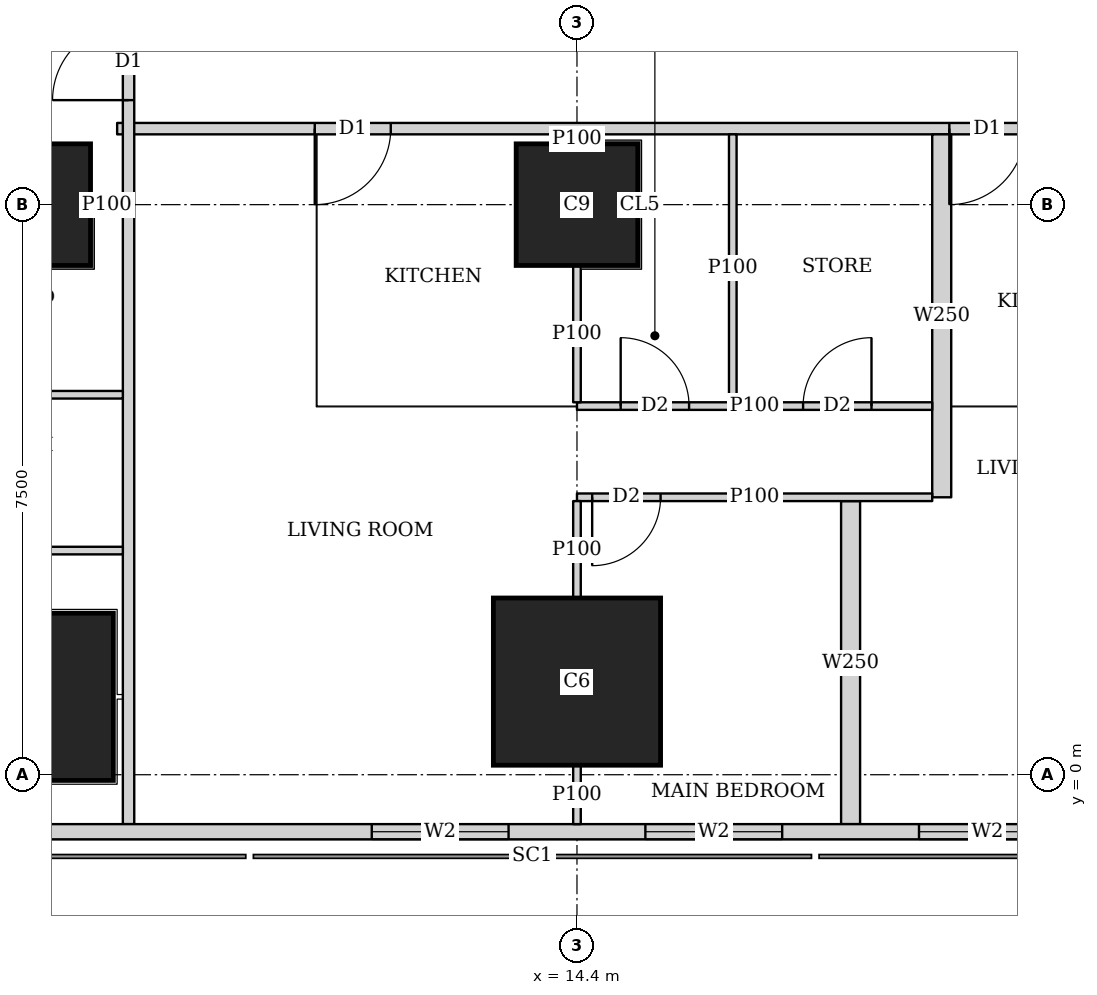
"""IFC4 building model, lengths in metres.
Left out: names, types, materials, properties, quantities, classifications, styles, units other than length and angle.
Written with IfcOpenShell. Run it as: python <this file> out.ifc"""

import sys

from ifc_helpers import new_model, si_unit, direction, frame, frame_2d, origin, origin_2d, place, context, subcontext, project, spatial, rectangle, extrude, element, fill, save


model = new_model("IFC4")
c1 = context("Model", 3, precision=1e-05, world=origin(), true_north=direction((0.0, 1.0)))
c2 = subcontext(c1, "Body", "Model", "MODEL_VIEW")
j1 = project(units=[si_unit("LENGTHUNIT", "METRE"), si_unit("PLANEANGLEUNIT", "RADIAN")], contexts=[c1])
p1 = place(None, origin())
s1 = spatial("IfcSite", under=j1, at=p1, CompositionType="ELEMENT")
p2 = place(p1, origin())
s2 = spatial("IfcBuilding", under=s1, at=p2, CompositionType="ELEMENT")
p3 = place(p2, frame((0.0, 0.0, 111.65)))
s3 = spatial("IfcBuildingStorey", under=s2, at=p3, CompositionType="ELEMENT", Elevation=111.65)
for number, where, z_axis, x_axis in (
    (1, (7.2, 1.025, 0.0), (0.0, 0.0, 1.0), (1.0, 0.0, 0.0)),
    (2, (14.4, 1.225, 0.0), (0.0, 0.0, 1.0), (1.0, 0.0, 0.0)),
):
    element("IfcColumn", number, at=place(p3, frame(where, z_axis=z_axis, x_axis=x_axis)), inside=s3, PredefinedType="COLUMN", context=c2, shape_type="SweptSolid", body=[
        extrude(rectangle(XDim=2.2, YDim=2.2, at=origin_2d()), origin(), (0.0, 0.0, 1.0), 3.75),
    ])
for number, where, z_axis, x_axis in (
    (3, (7.2, 7.5, 0.0), (0.0, 0.0, 1.0), (1.0, 0.0, 0.0)),
    (4, (14.4, 7.5, 0.0), (0.0, 0.0, 1.0), (1.0, 0.0, 0.0)),
):
    element("IfcColumn", number, at=place(p3, frame(where, z_axis=z_axis, x_axis=x_axis)), inside=s3, PredefinedType="COLUMN", context=c2, shape_type="SweptSolid", body=[
        extrude(rectangle(XDim=1.6, YDim=1.6, at=origin_2d()), origin(), (0.0, 0.0, 1.0), 3.75),
    ])
p4 = place(p3, frame((2.163, -0.75, 0.0), z_axis=(0.0, 0.0, 1.0), x_axis=(1.0, 0.0, 0.0)))
e5 = element("IfcWall", 5, at=p4, inside=s3, PredefinedType="SOLIDWALL", context=c2, shape_type="SweptSolid", body=[
    extrude(rectangle(XDim=45.628, YDim=0.2, at=frame_2d((22.814, 0.0))), origin(), (0.0, 0.0, 1.0), 3.5),
])
p5 = place(p4, frame((9.537, 0.0, 0.9)))
e6 = element("IfcOpeningElement", 6, at=p5, cuts=e5, PredefinedType="OPENING", context=c2, shape_type="SweptSolid", body=[
    extrude(rectangle(XDim=1.8, YDim=1.5, at=frame_2d((0.9, 0.75))), frame((0.0, 0.11, 0.0), z_axis=(0.0, -1.0, 0.0), x_axis=(1.0, 0.0, 0.0)), (0.0, 0.0, 1.0), 0.22),
])
p6 = place(p4, frame((13.137, 0.0, 0.9)))
e7 = element("IfcOpeningElement", 7, at=p6, cuts=e5, PredefinedType="OPENING", context=c2, shape_type="SweptSolid", body=[
    extrude(rectangle(XDim=1.8, YDim=1.5, at=frame_2d((0.9, 0.75))), frame((0.0, 0.11, 0.0), z_axis=(0.0, -1.0, 0.0), x_axis=(1.0, 0.0, 0.0)), (0.0, 0.0, 1.0), 0.22),
])
p7 = place(p4, frame((16.737, 0.0, 0.9)))
e8 = element("IfcOpeningElement", 8, at=p7, cuts=e5, PredefinedType="OPENING", context=c2, shape_type="SweptSolid", body=[
    extrude(rectangle(XDim=1.8, YDim=1.5, at=frame_2d((0.9, 0.75))), frame((0.0, 0.11, 0.0), z_axis=(0.0, -1.0, 0.0), x_axis=(1.0, 0.0, 0.0)), (0.0, 0.0, 1.0), 0.22),
])
p8 = place(p4, frame((20.337, 0.0, 0.9)))
e9 = element("IfcOpeningElement", 9, at=p8, cuts=e5, PredefinedType="OPENING", context=c2, shape_type="SweptSolid", body=[
    extrude(rectangle(XDim=1.8, YDim=1.5, at=frame_2d((0.9, 0.75))), frame((0.0, 0.11, 0.0), z_axis=(0.0, -1.0, 0.0), x_axis=(1.0, 0.0, 0.0)), (0.0, 0.0, 1.0), 0.22),
])
p9 = place(p4, frame((23.937, 0.0, 0.9)))
e10 = element("IfcOpeningElement", 10, at=p9, cuts=e5, PredefinedType="OPENING", context=c2, shape_type="SweptSolid", body=[
    extrude(rectangle(XDim=1.8, YDim=1.5, at=frame_2d((0.9, 0.75))), frame((0.0, 0.11, 0.0), z_axis=(0.0, -1.0, 0.0), x_axis=(1.0, 0.0, 0.0)), (0.0, 0.0, 1.0), 0.22),
])
p10 = place(p4, frame((27.537, 0.0, 0.9)))
e11 = element("IfcOpeningElement", 11, at=p10, cuts=e5, PredefinedType="OPENING", context=c2, shape_type="SweptSolid", body=[
    extrude(rectangle(XDim=1.8, YDim=1.5, at=frame_2d((0.9, 0.75))), frame((0.0, 0.11, 0.0), z_axis=(0.0, -1.0, 0.0), x_axis=(1.0, 0.0, 0.0)), (0.0, 0.0, 1.0), 0.22),
])
p11 = place(p4, frame((31.137, 0.0, 0.9)))
e12 = element("IfcOpeningElement", 12, at=p11, cuts=e5, PredefinedType="OPENING", context=c2, shape_type="SweptSolid", body=[
    extrude(rectangle(XDim=1.8, YDim=1.5, at=frame_2d((0.9, 0.75))), frame((0.0, 0.11, 0.0), z_axis=(0.0, -1.0, 0.0), x_axis=(1.0, 0.0, 0.0)), (0.0, 0.0, 1.0), 0.22),
])
p12 = place(p4, frame((34.737, 0.0, 0.9)))
e13 = element("IfcOpeningElement", 13, at=p12, cuts=e5, PredefinedType="OPENING", context=c2, shape_type="SweptSolid", body=[
    extrude(rectangle(XDim=1.8, YDim=1.5, at=frame_2d((0.9, 0.75))), frame((0.0, 0.11, 0.0), z_axis=(0.0, -1.0, 0.0), x_axis=(1.0, 0.0, 0.0)), (0.0, 0.0, 1.0), 0.22),
])
p13 = place(p3, frame((8.5, -0.65, 0.0), z_axis=(0.0, 0.0, 1.0), x_axis=(0.0, 1.0, 0.0)))
e14 = element("IfcWall", 14, at=p13, inside=s3, PredefinedType="SOLIDWALL", context=c2, shape_type="SweptSolid", body=[
    extrude(rectangle(XDim=46.3, YDim=0.15, at=frame_2d((23.15, 0.0))), origin(), (0.0, 0.0, 1.0), 2.2),
])
p14 = place(p13, frame((9.525, 0.0, 0.0)))
e15 = element("IfcOpeningElement", 15, at=p14, cuts=e14, PredefinedType="OPENING", context=c2, shape_type="SweptSolid", body=[
    extrude(rectangle(XDim=1.0, YDim=2.1, at=frame_2d((0.5, 1.05))), frame((0.0, 0.085, 0.0), z_axis=(0.0, -1.0, 0.0), x_axis=(1.0, 0.0, 0.0)), (0.0, 0.0, 1.0), 0.17),
])
p15 = place(p13, frame((13.275, 0.0, 0.0)))
e16 = element("IfcOpeningElement", 16, at=p15, cuts=e14, PredefinedType="OPENING", context=c2, shape_type="SweptSolid", body=[
    extrude(rectangle(XDim=1.0, YDim=2.1, at=frame_2d((0.5, 1.05))), frame((0.0, 0.085, 0.0), z_axis=(0.0, -1.0, 0.0), x_axis=(1.0, 0.0, 0.0)), (0.0, 0.0, 1.0), 0.17),
])
p16 = place(p13, frame((25.15, 0.0, 0.0)))
e17 = element("IfcOpeningElement", 17, at=p16, cuts=e14, PredefinedType="OPENING", context=c2, shape_type="SweptSolid", body=[
    extrude(rectangle(XDim=1.0, YDim=2.1, at=frame_2d((0.5, 1.05))), frame((0.0, 0.085, 0.0), z_axis=(0.0, -1.0, 0.0), x_axis=(1.0, 0.0, 0.0)), (0.0, 0.0, 1.0), 0.17),
])
p17 = place(p3, frame((40.053, 8.5, 0.0), z_axis=(0.0, 0.0, 1.0), x_axis=(-1.0, 0.0, 0.0)))
e18 = element("IfcWall", 18, at=p17, inside=s3, PredefinedType="SOLIDWALL", context=c2, shape_type="SweptSolid", body=[
    extrude(rectangle(XDim=31.703, YDim=0.15, at=frame_2d((15.852, 0.0))), origin(), (0.0, 0.0, 1.0), 3.5),
])
p18 = place(p17, frame((28.103, 0.0, 0.0)))
e19 = element("IfcOpeningElement", 19, at=p18, cuts=e18, PredefinedType="OPENING", context=c2, shape_type="SweptSolid", body=[
    extrude(rectangle(XDim=1.0, YDim=2.1, at=frame_2d((0.5, 1.05))), frame((0.0, 0.085, 0.0), z_axis=(0.0, -1.0, 0.0), x_axis=(1.0, 0.0, 0.0)), (0.0, 0.0, 1.0), 0.17),
])
p19 = place(p17, frame((19.754, 0.0, 0.0)))
e20 = element("IfcOpeningElement", 20, at=p19, cuts=e18, PredefinedType="OPENING", context=c2, shape_type="SweptSolid", body=[
    extrude(rectangle(XDim=1.0, YDim=2.1, at=frame_2d((0.5, 1.05))), frame((0.0, 0.085, 0.0), z_axis=(0.0, -1.0, 0.0), x_axis=(1.0, 0.0, 0.0)), (0.0, 0.0, 1.0), 0.17),
])
p20 = place(p17, frame((8.353, 0.0, 0.0)))
e21 = element("IfcOpeningElement", 21, at=p20, cuts=e18, PredefinedType="OPENING", context=c2, shape_type="SweptSolid", body=[
    extrude(rectangle(XDim=1.0, YDim=2.1, at=frame_2d((0.5, 1.05))), frame((0.0, 0.085, 0.0), z_axis=(0.0, -1.0, 0.0), x_axis=(1.0, 0.0, 0.0)), (0.0, 0.0, 1.0), 0.17),
])
p21 = place(p3, frame((4.9, 4.999, 0.0), z_axis=(0.0, 0.0, 1.0), x_axis=(1.0, 0.0, 0.0)))
e22 = element("IfcWall", 22, at=p21, inside=s3, PredefinedType="PARTITIONING", context=c2, shape_type="SweptSolid", body=[
    extrude(rectangle(XDim=3.525, YDim=0.1, at=frame_2d((1.763, 0.0))), origin(), (0.0, 0.0, 1.0), 3.5),
])
p22 = place(p3, frame((8.001, 7.5, 0.0), z_axis=(0.0, 0.0, 1.0), x_axis=(1.0, 0.0, 0.0)))
e23 = element("IfcWall", 23, at=p22, inside=s3, PredefinedType="PARTITIONING", context=c2, shape_type="SweptSolid", body=[
    extrude(rectangle(XDim=0.424, YDim=0.1, at=frame_2d((0.212, 0.0))), origin(), (0.0, 0.0, 1.0), 3.5),
])
p23 = place(p3, frame((4.9, 2.949, 0.0), z_axis=(0.0, 0.0, 1.0), x_axis=(1.0, 0.0, 0.0)))
e24 = element("IfcWall", 24, at=p23, inside=s3, PredefinedType="PARTITIONING", context=c2, shape_type="SweptSolid", body=[
    extrude(rectangle(XDim=3.525, YDim=0.1, at=frame_2d((1.763, 0.0))), origin(), (0.0, 0.0, 1.0), 3.5),
])
p24 = place(p23, frame((0.45, 0.0, 0.0)))
e25 = element("IfcOpeningElement", 25, at=p24, cuts=e24, PredefinedType="OPENING", context=c2, shape_type="SweptSolid", body=[
    extrude(rectangle(XDim=0.9, YDim=2.1, at=frame_2d((0.45, 1.05))), frame((0.0, 0.06, 0.0), z_axis=(0.0, -1.0, 0.0), x_axis=(1.0, 0.0, 0.0)), (0.0, 0.0, 1.0), 0.12),
])
p25 = place(p3, frame((19.074, 3.65, 0.0), z_axis=(0.0, 0.0, 1.0), x_axis=(-1.0, 0.0, 0.0)))
e26 = element("IfcWall", 26, at=p25, inside=s3, PredefinedType="PARTITIONING", context=c2, shape_type="SweptSolid", body=[
    extrude(rectangle(XDim=4.674, YDim=0.1, at=frame_2d((2.337, 0.0))), origin(), (0.0, 0.0, 1.0), 3.5),
])
p26 = place(p25, frame((3.574, 0.0, 0.0)))
e27 = element("IfcOpeningElement", 27, at=p26, cuts=e26, PredefinedType="OPENING", context=c2, shape_type="SweptSolid", body=[
    extrude(rectangle(XDim=0.9, YDim=2.1, at=frame_2d((0.45, 1.05))), frame((0.0, 0.06, 0.0), z_axis=(0.0, -1.0, 0.0), x_axis=(1.0, 0.0, 0.0)), (0.0, 0.0, 1.0), 0.12),
])
p27 = place(p3, frame((19.074, 4.85, 0.0), z_axis=(0.0, 0.0, 1.0), x_axis=(-1.0, 0.0, 0.0)))
e28 = element("IfcWall", 28, at=p27, inside=s3, PredefinedType="PARTITIONING", context=c2, shape_type="SweptSolid", body=[
    extrude(rectangle(XDim=4.674, YDim=0.1, at=frame_2d((2.337, 0.0))), origin(), (0.0, 0.0, 1.0), 3.5),
])
p28 = place(p27, frame((3.199, 0.0, 0.0)))
e29 = element("IfcOpeningElement", 29, at=p28, cuts=e28, PredefinedType="OPENING", context=c2, shape_type="SweptSolid", body=[
    extrude(rectangle(XDim=0.9, YDim=2.1, at=frame_2d((0.45, 1.05))), frame((0.0, 0.06, 0.0), z_axis=(0.0, -1.0, 0.0), x_axis=(1.0, 0.0, 0.0)), (0.0, 0.0, 1.0), 0.12),
])
p29 = place(p27, frame((0.799, 0.0, 0.0)))
e30 = element("IfcOpeningElement", 30, at=p29, cuts=e28, PredefinedType="OPENING", context=c2, shape_type="SweptSolid", body=[
    extrude(rectangle(XDim=0.9, YDim=2.1, at=frame_2d((0.45, 1.05))), frame((0.0, 0.06, 0.0), z_axis=(0.0, -1.0, 0.0), x_axis=(1.0, 0.0, 0.0)), (0.0, 0.0, 1.0), 0.12),
])
p30 = place(p3, frame((14.4, -0.65, 0.0), z_axis=(0.0, 0.0, 1.0), x_axis=(0.0, 1.0, 0.0)))
e31 = element("IfcWall", 31, at=p30, inside=s3, PredefinedType="PARTITIONING", context=c2, shape_type="SweptSolid", body=[
    extrude(rectangle(XDim=0.774, YDim=0.1, at=frame_2d((0.387, 0.0))), origin(), (0.0, 0.0, 1.0), 3.5),
])
p31 = place(p3, frame((14.4, 2.326, 0.0), z_axis=(0.0, 0.0, 1.0), x_axis=(0.0, 1.0, 0.0)))
e32 = element("IfcWall", 32, at=p31, inside=s3, PredefinedType="PARTITIONING", context=c2, shape_type="SweptSolid", body=[
    extrude(rectangle(XDim=1.274, YDim=0.1, at=frame_2d((0.637, 0.0))), origin(), (0.0, 0.0, 1.0), 3.5),
])
p32 = place(p3, frame((14.4, 4.9, 0.0), z_axis=(0.0, 0.0, 1.0), x_axis=(0.0, 1.0, 0.0)))
e33 = element("IfcWall", 33, at=p32, inside=s3, PredefinedType="PARTITIONING", context=c2, shape_type="SweptSolid", body=[
    extrude(rectangle(XDim=1.799, YDim=0.1, at=frame_2d((0.899, 0.0))), origin(), (0.0, 0.0, 1.0), 3.5),
])
p33 = place(p3, frame((14.4, 8.301, 0.0), z_axis=(0.0, 0.0, 1.0), x_axis=(0.0, 1.0, 0.0)))
e34 = element("IfcWall", 34, at=p33, inside=s3, PredefinedType="PARTITIONING", context=c2, shape_type="SweptSolid", body=[
    extrude(rectangle(XDim=0.124, YDim=0.1, at=frame_2d((0.062, 0.0))), origin(), (0.0, 0.0, 1.0), 3.5),
])
p34 = place(p3, frame((16.45, 4.9, 0.0), z_axis=(0.0, 0.0, 1.0), x_axis=(0.0, 1.0, 0.0)))
e35 = element("IfcWall", 35, at=p34, inside=s3, PredefinedType="PARTITIONING", context=c2, shape_type="SweptSolid", body=[
    extrude(rectangle(XDim=3.525, YDim=0.1, at=frame_2d((1.763, 0.0))), origin(), (0.0, 0.0, 1.0), 3.5),
])
p35 = place(p3, frame((18.0, -0.65, 0.0), z_axis=(0.0, 0.0, 1.0), x_axis=(0.0, 1.0, 0.0)))
e36 = element("IfcWall", 36, at=p35, inside=s3, PredefinedType="SOLIDWALL", context=c2, shape_type="SweptSolid", body=[
    extrude(rectangle(XDim=4.25, YDim=0.25, at=frame_2d((2.125, 0.0))), origin(), (0.0, 0.0, 1.0), 2.2),
])
p36 = place(p3, frame((19.199, 3.65, 0.0), z_axis=(0.0, 0.0, 1.0), x_axis=(0.0, 1.0, 0.0)))
e37 = element("IfcWall", 37, at=p36, inside=s3, PredefinedType="SOLIDWALL", context=c2, shape_type="SweptSolid", body=[
    extrude(rectangle(XDim=4.775, YDim=0.25, at=frame_2d((2.388, 0.0))), origin(), (0.0, 0.0, 1.0), 3.5),
])
p37 = place(p5, origin())
e38 = element("IfcWindow", 38, at=p37, inside=s3, PartitioningType="SINGLE_PANEL", PredefinedType="WINDOW", context=c2, shape_type="SweptSolid", body=[
    extrude(rectangle(XDim=1.8, YDim=1.5, at=frame_2d((0.9, 0.75))), frame((0.0, 0.03, 0.0), z_axis=(0.0, -1.0, 0.0), x_axis=(1.0, 0.0, 0.0)), (0.0, 0.0, 1.0), 0.06),
])
fill(e6, e38)
p38 = place(p6, origin())
e39 = element("IfcWindow", 39, at=p38, inside=s3, PartitioningType="SINGLE_PANEL", PredefinedType="WINDOW", context=c2, shape_type="SweptSolid", body=[
    extrude(rectangle(XDim=1.8, YDim=1.5, at=frame_2d((0.9, 0.75))), frame((0.0, 0.03, 0.0), z_axis=(0.0, -1.0, 0.0), x_axis=(1.0, 0.0, 0.0)), (0.0, 0.0, 1.0), 0.06),
])
fill(e7, e39)
p39 = place(p7, origin())
e40 = element("IfcWindow", 40, at=p39, inside=s3, PartitioningType="SINGLE_PANEL", PredefinedType="WINDOW", context=c2, shape_type="SweptSolid", body=[
    extrude(rectangle(XDim=1.8, YDim=1.5, at=frame_2d((0.9, 0.75))), frame((0.0, 0.03, 0.0), z_axis=(0.0, -1.0, 0.0), x_axis=(1.0, 0.0, 0.0)), (0.0, 0.0, 1.0), 0.06),
])
fill(e8, e40)
p40 = place(p14, origin())
e41 = element("IfcDoor", 41, at=p40, inside=s3, OperationType="SINGLE_SWING_LEFT", PredefinedType="DOOR", context=c2, shape_type="SweptSolid", body=[
    extrude(rectangle(XDim=1.0, YDim=2.1, at=frame_2d((0.5, 1.05))), frame((0.0, 0.025, 0.0), z_axis=(0.0, -1.0, 0.0), x_axis=(1.0, 0.0, 0.0)), (0.0, 0.0, 1.0), 0.05),
])
fill(e15, e41)
p41 = place(p26, origin())
e42 = element("IfcDoor", 42, at=p41, inside=s3, OperationType="SINGLE_SWING_RIGHT", PredefinedType="DOOR", context=c2, shape_type="SweptSolid", body=[
    extrude(rectangle(XDim=0.9, YDim=2.1, at=frame_2d((0.45, 1.05))), frame((0.0, 0.025, 0.0), z_axis=(0.0, -1.0, 0.0), x_axis=(1.0, 0.0, 0.0)), (0.0, 0.0, 1.0), 0.05),
])
fill(e27, e42)
p42 = place(p28, origin())
e43 = element("IfcDoor", 43, at=p42, inside=s3, OperationType="SINGLE_SWING_LEFT", PredefinedType="DOOR", context=c2, shape_type="SweptSolid", body=[
    extrude(rectangle(XDim=0.9, YDim=2.1, at=frame_2d((0.45, 1.05))), frame((0.0, 0.025, 0.0), z_axis=(0.0, -1.0, 0.0), x_axis=(1.0, 0.0, 0.0)), (0.0, 0.0, 1.0), 0.05),
])
fill(e29, e43)
p43 = place(p29, origin())
e44 = element("IfcDoor", 44, at=p43, inside=s3, OperationType="SINGLE_SWING_RIGHT", PredefinedType="DOOR", context=c2, shape_type="SweptSolid", body=[
    extrude(rectangle(XDim=0.9, YDim=2.1, at=frame_2d((0.45, 1.05))), frame((0.0, 0.025, 0.0), z_axis=(0.0, -1.0, 0.0), x_axis=(1.0, 0.0, 0.0)), (0.0, 0.0, 1.0), 0.05),
])
fill(e30, e44)
p44 = place(p18, origin())
e45 = element("IfcDoor", 45, at=p44, inside=s3, OperationType="SINGLE_SWING_RIGHT", PredefinedType="DOOR", context=c2, shape_type="SweptSolid", body=[
    extrude(rectangle(XDim=1.0, YDim=2.1, at=frame_2d((0.5, 1.05))), frame((0.0, 0.025, 0.0), z_axis=(0.0, -1.0, 0.0), x_axis=(1.0, 0.0, 0.0)), (0.0, 0.0, 1.0), 0.05),
])
fill(e19, e45)
p45 = place(p19, origin())
e46 = element("IfcDoor", 46, at=p45, inside=s3, OperationType="SINGLE_SWING_RIGHT", PredefinedType="DOOR", context=c2, shape_type="SweptSolid", body=[
    extrude(rectangle(XDim=1.0, YDim=2.1, at=frame_2d((0.5, 1.05))), frame((0.0, 0.025, 0.0), z_axis=(0.0, -1.0, 0.0), x_axis=(1.0, 0.0, 0.0)), (0.0, 0.0, 1.0), 0.05),
])
fill(e20, e46)
save(model, sys.argv[1])
